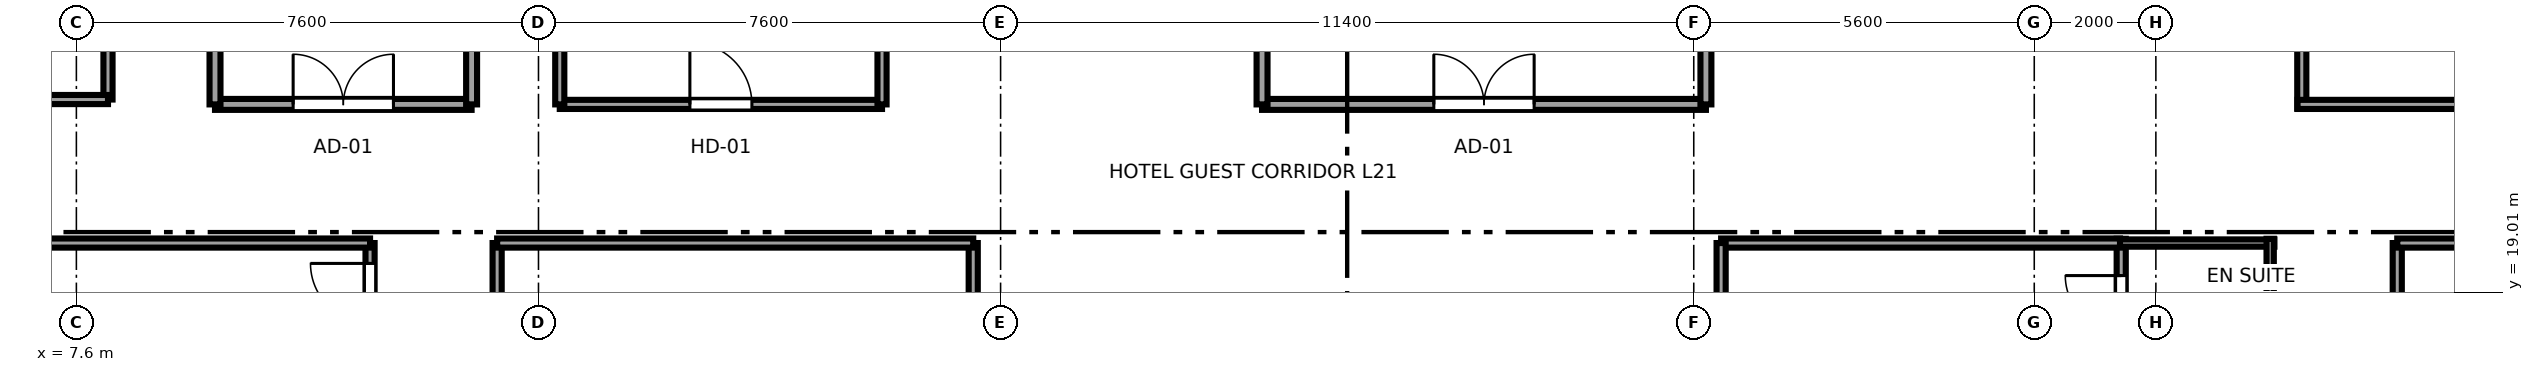
"""IFC4 building model, lengths in metres.
Left out: names, types, materials, properties, quantities, classifications, styles, units other than length and angle.
Written with IfcOpenShell. Run it as: python <this file> out.ifc"""

import sys

from ifc_helpers import new_model, si_unit, direction, frame, frame_2d, origin, place, context, subcontext, project, spatial, rectangle, extrude, source, transform, mapped, element, fill, save


model = new_model("IFC4")
c1 = context("Model", 3, precision=1e-05, world=origin(), true_north=direction((0.0, 1.0)))
c2 = subcontext(c1, "Body", "Model", "MODEL_VIEW")
j1 = project(units=[si_unit("LENGTHUNIT", "METRE"), si_unit("PLANEANGLEUNIT", "RADIAN")], contexts=[c1])
p1 = place(None, origin())
s1 = spatial("IfcSite", under=j1, at=p1, CompositionType="ELEMENT")
p2 = place(p1, origin())
s2 = spatial("IfcBuilding", under=s1, at=p2, CompositionType="ELEMENT")
p3 = place(p2, frame((0.0, 0.0, 85.25)))
s3 = spatial("IfcBuildingStorey", under=s2, at=p3, CompositionType="ELEMENT", Elevation=85.25)
p4 = place(p3, frame((41.23, 17.9, 0.0), z_axis=(0.0, 0.0, 1.0), x_axis=(0.0, 1.0, 0.0)))
e1 = element("IfcWall", 1, at=p4, inside=s3, PredefinedType="PARTITIONING", context=c2, shape_type="SweptSolid", body=[
    extrude(rectangle(XDim=1.99, YDim=0.15, at=frame_2d((0.995, 0.0))), origin(), (0.0, 0.0, 1.0), 3.37),
])
p5 = place(p4, frame((0.465, 0.0, 0.0)))
e2 = element("IfcOpeningElement", 2, at=p5, cuts=e1, PredefinedType="OPENING", context=c2, shape_type="SweptSolid", body=[
    extrude(rectangle(XDim=0.92, YDim=2.01, at=frame_2d((0.46, 1.005))), frame((0.0, 0.085, 0.0), z_axis=(0.0, -1.0, 0.0), x_axis=(1.0, 0.0, 0.0)), (0.0, 0.0, 1.0), 0.17),
])
p6 = place(p3, frame((41.16, 19.82, 0.0), z_axis=(0.0, 0.0, 1.0), x_axis=(1.0, 0.0, 0.0)))
e3 = element("IfcWall", 3, at=p6, inside=s3, PredefinedType="PLUMBINGWALL", context=c2, shape_type="SweptSolid", body=[
    extrude(rectangle(XDim=2.59, YDim=0.12, at=frame_2d((1.295, 0.0))), origin(), (0.0, 0.0, 1.0), 3.37),
])
p7 = place(p3, frame((43.68, 17.9, 0.0), z_axis=(0.0, 0.0, 1.0), x_axis=(0.0, 1.0, 0.0)))
e4 = element("IfcWall", 4, at=p7, inside=s3, PredefinedType="PLUMBINGWALL", context=c2, shape_type="SweptSolid", body=[
    extrude(rectangle(XDim=1.99, YDim=0.12, at=frame_2d((0.995, 0.0))), origin(), (0.0, 0.0, 1.0), 3.37),
])
p8 = place(p3, frame((12.43, 18.21, 0.0), z_axis=(0.0, 0.0, 1.0), x_axis=(0.0, 1.0, 0.0)))
e5 = element("IfcWall", 5, at=p8, inside=s3, PredefinedType="PARTITIONING", context=c2, shape_type="SweptSolid", body=[
    extrude(rectangle(XDim=1.61, YDim=0.15, at=frame_2d((0.805, 0.0))), origin(), (0.0, 0.0, 1.0), 3.37),
])
p9 = place(p8, frame((0.295, 0.0, 0.0)))
e6 = element("IfcOpeningElement", 6, at=p9, cuts=e5, PredefinedType="OPENING", context=c2, shape_type="SweptSolid", body=[
    extrude(rectangle(XDim=0.98, YDim=2.12, at=frame_2d((0.49, 1.06))), frame((0.0, 0.085, 0.0), z_axis=(0.0, -1.0, 0.0), x_axis=(1.0, 0.0, 0.0)), (0.0, 0.0, 1.0), 0.17),
])
p10 = place(p3, frame((0.405, 19.82, 0.0), z_axis=(0.0, 0.0, 1.0), x_axis=(1.0, 0.0, 0.0)))
e7 = element("IfcWall", 7, at=p10, inside=s3, PredefinedType="PARTITIONING", context=c2, shape_type="SweptSolid", body=[
    extrude(rectangle(XDim=12.025, YDim=0.15, at=frame_2d((6.012, 0.0))), origin(), (0.0, 0.0, 1.0), 3.37),
])
p11 = place(p3, frame((14.52, 12.41, 0.0), z_axis=(0.0, 0.0, 1.0), x_axis=(0.0, 1.0, 0.0)))
e8 = element("IfcWall", 8, at=p11, inside=s3, PredefinedType="PARTITIONING", context=c2, shape_type="SweptSolid", body=[
    extrude(rectangle(XDim=7.41, YDim=0.15, at=frame_2d((3.705, 0.0))), origin(), (0.0, 0.0, 1.0), 3.37),
])
p12 = place(p11, frame((4.995, 0.0, 0.0)))
e9 = element("IfcOpeningElement", 9, at=p12, cuts=e8, PredefinedType="OPENING", context=c2, shape_type="SweptSolid", body=[
    extrude(rectangle(XDim=0.98, YDim=2.12, at=frame_2d((0.49, 1.06))), frame((0.0, 0.085, 0.0), z_axis=(0.0, -1.0, 0.0), x_axis=(1.0, 0.0, 0.0)), (0.0, 0.0, 1.0), 0.17),
])
p13 = place(p3, frame((22.35, 10.08, 0.0), z_axis=(0.0, 0.0, 1.0), x_axis=(0.0, 1.0, 0.0)))
e10 = element("IfcWall", 10, at=p13, inside=s3, PredefinedType="PARTITIONING", context=c2, shape_type="SweptSolid", body=[
    extrude(rectangle(XDim=9.74, YDim=0.15, at=frame_2d((4.87, 0.0))), origin(), (0.0, 0.0, 1.0), 3.37),
])
p14 = place(p3, frame((14.52, 19.82, 0.0), z_axis=(0.0, 0.0, 1.0), x_axis=(1.0, 0.0, 0.0)))
e11 = element("IfcWall", 11, at=p14, inside=s3, PredefinedType="PARTITIONING", context=c2, shape_type="SweptSolid", body=[
    extrude(rectangle(XDim=7.83, YDim=0.15, at=frame_2d((3.915, 0.0))), origin(), (0.0, 0.0, 1.0), 3.37),
])
p15 = place(p3, frame((34.65, 19.82, 0.0), z_axis=(0.0, 0.0, 1.0), x_axis=(1.0, 0.0, 0.0)))
e12 = element("IfcWall", 12, at=p15, inside=s3, PredefinedType="PARTITIONING", context=c2, shape_type="SweptSolid", body=[
    extrude(rectangle(XDim=6.56, YDim=0.15, at=frame_2d((3.28, 0.0))), origin(), (0.0, 0.0, 1.0), 3.37),
])
p16 = place(p3, frame((34.65, 15.08, 0.0), z_axis=(0.0, 0.0, 1.0), x_axis=(0.0, 1.0, 0.0)))
e13 = element("IfcWall", 13, at=p16, inside=s3, PredefinedType="PARTITIONING", context=c2, shape_type="SweptSolid", body=[
    extrude(rectangle(XDim=4.74, YDim=0.15, at=frame_2d((2.37, 0.0))), origin(), (0.0, 0.0, 1.0), 3.37),
])
p17 = place(p3, frame((45.77, 12.41, 0.0), z_axis=(0.0, 0.0, 1.0), x_axis=(0.0, 1.0, 0.0)))
e14 = element("IfcWall", 14, at=p17, inside=s3, PredefinedType="PARTITIONING", context=c2, shape_type="SweptSolid", body=[
    extrude(rectangle(XDim=7.41, YDim=0.15, at=frame_2d((3.705, 0.0))), origin(), (0.0, 0.0, 1.0), 3.37),
])
p18 = place(p17, frame((3.195, 0.0, 0.0)))
e15 = element("IfcOpeningElement", 15, at=p18, cuts=e14, PredefinedType="OPENING", context=c2, shape_type="SweptSolid", body=[
    extrude(rectangle(XDim=0.98, YDim=2.12, at=frame_2d((0.49, 1.06))), frame((0.0, 0.085, 0.0), z_axis=(0.0, -1.0, 0.0), x_axis=(1.0, 0.0, 0.0)), (0.0, 0.0, 1.0), 0.17),
])
p19 = place(p3, frame((45.77, 19.82, 0.0), z_axis=(0.0, 0.0, 1.0), x_axis=(1.0, 0.0, 0.0)))
e16 = element("IfcWall", 16, at=p19, inside=s3, PredefinedType="PARTITIONING", context=c2, shape_type="SweptSolid", body=[
    extrude(rectangle(XDim=10.825, YDim=0.15, at=frame_2d((5.413, 0.0))), origin(), (0.0, 0.0, 1.0), 3.37),
])
p20 = place(p3, frame((8.12, 22.18, 0.0), z_axis=(0.0, 0.0, 1.0), x_axis=(0.0, 1.0, 0.0)))
e17 = element("IfcWall", 17, at=p20, inside=s3, PredefinedType="PARTITIONING", context=c2, shape_type="SweptSolid", body=[
    extrude(rectangle(XDim=5.24, YDim=0.15, at=frame_2d((2.62, 0.0))), origin(), (0.0, 0.0, 1.0), 3.37),
])
p21 = place(p20, frame((3.48, 0.0, 0.0)))
e18 = element("IfcOpeningElement", 18, at=p21, cuts=e17, PredefinedType="OPENING", context=c2, shape_type="SweptSolid", body=[
    extrude(rectangle(XDim=0.98, YDim=2.12, at=frame_2d((0.49, 1.06))), frame((0.0, 0.085, 0.0), z_axis=(0.0, -1.0, 0.0), x_axis=(1.0, 0.0, 0.0)), (0.0, 0.0, 1.0), 0.17),
])
p22 = place(p3, frame((0.405, 22.18, 0.0), z_axis=(0.0, 0.0, 1.0), x_axis=(1.0, 0.0, 0.0)))
e19 = element("IfcWall", 19, at=p22, inside=s3, PredefinedType="PARTITIONING", context=c2, shape_type="SweptSolid", body=[
    extrude(rectangle(XDim=7.715, YDim=0.15, at=frame_2d((3.857, 0.0))), origin(), (0.0, 0.0, 1.0), 3.37),
])
p23 = place(p3, frame((44.2, 22.03, 0.0), z_axis=(0.0, 0.0, 1.0), x_axis=(0.0, 1.0, 0.0)))
e20 = element("IfcWall", 20, at=p23, inside=s3, PredefinedType="PARTITIONING", context=c2, shape_type="SweptSolid", body=[
    extrude(rectangle(XDim=3.94, YDim=0.15, at=frame_2d((1.97, 0.0))), origin(), (0.0, 0.0, 1.0), 3.37),
])
p24 = place(p23, frame((1.34, 0.0, 0.0)))
e21 = element("IfcOpeningElement", 21, at=p24, cuts=e20, PredefinedType="OPENING", context=c2, shape_type="SweptSolid", body=[
    extrude(rectangle(XDim=0.92, YDim=2.01, at=frame_2d((0.46, 1.005))), frame((0.0, 0.085, 0.0), z_axis=(0.0, -1.0, 0.0), x_axis=(1.0, 0.0, 0.0)), (0.0, 0.0, 1.0), 0.17),
])
p25 = place(p3, frame((44.13, 22.1, 0.0), z_axis=(0.0, 0.0, 1.0), x_axis=(1.0, 0.0, 0.0)))
e22 = element("IfcWall", 22, at=p25, inside=s3, PredefinedType="PARTITIONING", context=c2, shape_type="SweptSolid", body=[
    extrude(rectangle(XDim=4.54, YDim=0.15, at=frame_2d((2.27, 0.0))), origin(), (0.0, 0.0, 1.0), 3.37),
])
p26 = place(p3, frame((9.88, 22.1, 0.0), z_axis=(0.0, 0.0, 1.0), x_axis=(1.0, 0.0, 0.0)))
e23 = element("IfcWall", 23, at=p26, inside=s3, PredefinedType="PARTITIONING", context=c2, shape_type="SweptSolid", body=[
    extrude(rectangle(XDim=4.22, YDim=0.18, at=frame_2d((2.11, 0.0))), origin(), (0.0, 0.0, 1.0), 3.37),
])
p27 = place(p26, frame((1.285, 0.0, 0.0)))
e24 = element("IfcOpeningElement", 24, at=p27, cuts=e23, PredefinedType="OPENING", context=c2, shape_type="SweptSolid", body=[
    extrude(rectangle(XDim=1.65, YDim=2.15, at=frame_2d((0.825, 1.075))), frame((0.0, 0.1, 0.0), z_axis=(0.0, -1.0, 0.0), x_axis=(1.0, 0.0, 0.0)), (0.0, 0.0, 1.0), 0.2),
])
for number, where, z_axis, x_axis in (
    (25, (9.88, 22.1, 0.0), (0.0, 0.0, 1.0), (0.0, 1.0, 0.0)),
    (26, (14.1, 22.1, 0.0), (0.0, 0.0, 1.0), (0.0, 1.0, 0.0)),
):
    element("IfcWall", number, at=place(p3, frame(where, z_axis=z_axis, x_axis=x_axis)), inside=s3, PredefinedType="PARTITIONING", context=c2, shape_type="SweptSolid", body=[
        extrude(rectangle(XDim=7.65, YDim=0.18, at=frame_2d((3.825, 0.0))), origin(), (0.0, 0.0, 1.0), 3.37),
    ])
p28 = place(p3, frame((27.1, 22.1, 0.0), z_axis=(0.0, 0.0, 1.0), x_axis=(1.0, 0.0, 0.0)))
e27 = element("IfcWall", 27, at=p28, inside=s3, PredefinedType="PARTITIONING", context=c2, shape_type="SweptSolid", body=[
    extrude(rectangle(XDim=7.3, YDim=0.18, at=frame_2d((3.65, 0.0))), origin(), (0.0, 0.0, 1.0), 3.37),
])
p29 = place(p28, frame((2.825, 0.0, 0.0)))
e28 = element("IfcOpeningElement", 28, at=p29, cuts=e27, PredefinedType="OPENING", context=c2, shape_type="SweptSolid", body=[
    extrude(rectangle(XDim=1.65, YDim=2.15, at=frame_2d((0.825, 1.075))), frame((0.0, 0.1, 0.0), z_axis=(0.0, -1.0, 0.0), x_axis=(1.0, 0.0, 0.0)), (0.0, 0.0, 1.0), 0.2),
])
for number, where, z_axis, x_axis in (
    (29, (27.1, 22.1, 0.0), (0.0, 0.0, 1.0), (0.0, 1.0, 0.0)),
    (30, (34.4, 22.1, 0.0), (0.0, 0.0, 1.0), (0.0, 1.0, 0.0)),
):
    element("IfcWall", number, at=place(p3, frame(where, z_axis=z_axis, x_axis=x_axis)), inside=s3, PredefinedType="PARTITIONING", context=c2, shape_type="SweptSolid", body=[
        extrude(rectangle(XDim=7.7, YDim=0.18, at=frame_2d((3.85, 0.0))), origin(), (0.0, 0.0, 1.0), 3.37),
    ])
p30 = place(p3, frame((15.55, 22.1, 0.0), z_axis=(0.0, 0.0, 1.0), x_axis=(1.0, 0.0, 0.0)))
e31 = element("IfcWall", 31, at=p30, inside=s3, PredefinedType="PARTITIONING", context=c2, shape_type="SweptSolid", body=[
    extrude(rectangle(XDim=5.3, YDim=0.15, at=frame_2d((2.65, 0.0))), origin(), (0.0, 0.0, 1.0), 3.37),
])
p31 = place(p30, frame((2.14, 0.0, 0.0)))
e32 = element("IfcOpeningElement", 32, at=p31, cuts=e31, PredefinedType="OPENING", context=c2, shape_type="SweptSolid", body=[
    extrude(rectangle(XDim=1.02, YDim=2.03, at=frame_2d((0.51, 1.015))), frame((0.0, 0.085, 0.0), z_axis=(0.0, -1.0, 0.0), x_axis=(1.0, 0.0, 0.0)), (0.0, 0.0, 1.0), 0.17),
])
for number, where, z_axis, x_axis in (
    (33, (15.55, 22.1, 0.0), (0.0, 0.0, 1.0), (0.0, 1.0, 0.0)),
    (34, (20.85, 22.1, 0.0), (0.0, 0.0, 1.0), (0.0, 1.0, 0.0)),
):
    element("IfcWall", number, at=place(p3, frame(where, z_axis=z_axis, x_axis=x_axis)), inside=s3, PredefinedType="PARTITIONING", context=c2, shape_type="SweptSolid", body=[
        extrude(rectangle(XDim=7.7, YDim=0.15, at=frame_2d((3.85, 0.0))), origin(), (0.0, 0.0, 1.0), 3.37),
    ])
m1 = source(origin(), c2, "Body", "SweptSolid", [
    extrude(rectangle(XDim=0.92, YDim=2.01, at=frame_2d((0.46, 1.005))), frame((0.0, 0.025, 0.0), z_axis=(0.0, -1.0, 0.0), x_axis=(1.0, 0.0, 0.0)), (0.0, 0.0, 1.0), 0.05),
])
p32 = place(p5, origin())
e35 = element("IfcDoor", 35, at=p32, inside=s3, OperationType="SINGLE_SWING_RIGHT", PredefinedType="DOOR", context=c2, shape_type="MappedRepresentation", body=[
    mapped(m1, transform((0.0, 0.0, 0.0), x_axis=(1.0, 0.0, 0.0), y_axis=(0.0, 1.0, 0.0), z_axis=(0.0, 0.0, 1.0), scale=1.0)),
])
fill(e2, e35)
m2 = source(origin(), c2, "Body", "SweptSolid", [
    extrude(rectangle(XDim=0.98, YDim=2.12, at=frame_2d((0.49, 1.06))), frame((0.0, 0.025, 0.0), z_axis=(0.0, -1.0, 0.0), x_axis=(1.0, 0.0, 0.0)), (0.0, 0.0, 1.0), 0.05),
])
p33 = place(p9, origin())
e36 = element("IfcDoor", 36, at=p33, inside=s3, OperationType="SINGLE_SWING_RIGHT", PredefinedType="DOOR", context=c2, shape_type="MappedRepresentation", body=[
    mapped(m2, transform((0.0, 0.0, 0.0), x_axis=(1.0, 0.0, 0.0), y_axis=(0.0, 1.0, 0.0), z_axis=(0.0, 0.0, 1.0), scale=1.0)),
])
fill(e6, e36)
m3 = source(origin(), c2, "Body", "SweptSolid", [
    extrude(rectangle(XDim=1.65, YDim=2.15, at=frame_2d((0.825, 1.075))), frame((0.0, 0.025, 0.0), z_axis=(0.0, -1.0, 0.0), x_axis=(1.0, 0.0, 0.0)), (0.0, 0.0, 1.0), 0.05),
])
p34 = place(p27, origin())
e37 = element("IfcDoor", 37, at=p34, inside=s3, OperationType="DOUBLE_DOOR_SINGLE_SWING", PredefinedType="DOOR", context=c2, shape_type="MappedRepresentation", body=[
    mapped(m3, transform((0.0, 0.0, 0.0), x_axis=(1.0, 0.0, 0.0), y_axis=(0.0, 1.0, 0.0), z_axis=(0.0, 0.0, 1.0), scale=1.0)),
])
fill(e24, e37)
p35 = place(p29, origin())
e38 = element("IfcDoor", 38, at=p35, inside=s3, OperationType="DOUBLE_DOOR_SINGLE_SWING", PredefinedType="DOOR", context=c2, shape_type="MappedRepresentation", body=[
    mapped(m3, transform((0.0, 0.0, 0.0), x_axis=(1.0, 0.0, 0.0), y_axis=(0.0, 1.0, 0.0), z_axis=(0.0, 0.0, 1.0), scale=1.0)),
])
fill(e28, e38)
m4 = source(origin(), c2, "Body", "SweptSolid", [
    extrude(rectangle(XDim=1.02, YDim=2.03, at=frame_2d((0.51, 1.015))), frame((0.0, 0.025, 0.0), z_axis=(0.0, -1.0, 0.0), x_axis=(1.0, 0.0, 0.0)), (0.0, 0.0, 1.0), 0.05),
])
p36 = place(p31, origin())
e39 = element("IfcDoor", 39, at=p36, inside=s3, OperationType="SINGLE_SWING_LEFT", PredefinedType="DOOR", context=c2, shape_type="MappedRepresentation", body=[
    mapped(m4, transform((0.0, 0.0, 0.0), x_axis=(1.0, 0.0, 0.0), y_axis=(0.0, 1.0, 0.0), z_axis=(0.0, 0.0, 1.0), scale=1.0)),
])
fill(e32, e39)
save(model, sys.argv[1])
